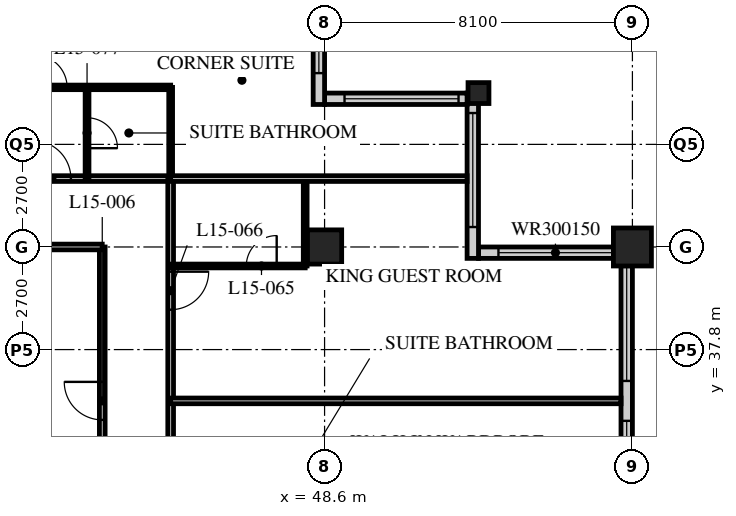
"""IFC4 building model, lengths in metres.
Left out: names, types, materials, properties, quantities, classifications, styles, units other than length and angle.
Written with IfcOpenShell. Run it as: python <this file> out.ifc"""

import sys

from ifc_helpers import new_model, si_unit, direction, frame, frame_2d, origin, origin_2d, place, context, subcontext, project, spatial, rectangle, hollow_rectangle, extrude, element, fill, save


model = new_model("IFC4")
c1 = context("Model", 3, precision=1e-05, world=origin(), true_north=direction((0.0, 1.0)))
c2 = subcontext(c1, "Body", "Model", "MODEL_VIEW")
j1 = project(units=[si_unit("LENGTHUNIT", "METRE"), si_unit("PLANEANGLEUNIT", "RADIAN")], contexts=[c1])
p1 = place(None, origin())
s1 = spatial("IfcSite", under=j1, at=p1, CompositionType="ELEMENT")
p2 = place(p1, origin())
s2 = spatial("IfcBuilding", under=s1, at=p2, CompositionType="ELEMENT")
p3 = place(p2, frame((0.0, 0.0, 63.6)))
s3 = spatial("IfcBuildingStorey", under=s2, at=p3, CompositionType="ELEMENT", Elevation=63.6)
p4 = place(p3, frame((48.6, 40.5, 0.0), z_axis=(0.0, 0.0, 1.0), x_axis=(1.0, 0.0, 0.0)))
e1 = element("IfcColumn", 1, at=p4, inside=s3, PredefinedType="COLUMN", context=c2, shape_type="SweptSolid", body=[
    extrude(hollow_rectangle(XDim=0.9, YDim=0.9, WallThickness=0.09, at=origin_2d()), origin(), (0.0, 0.0, 1.0), 3.4),
])
p5 = place(p3, frame((52.65, 44.55, 0.0), z_axis=(0.0, 0.0, 1.0), x_axis=(1.0, 0.0, 0.0)))
e2 = element("IfcColumn", 2, at=p5, inside=s3, PredefinedType="COLUMN", context=c2, shape_type="SweptSolid", body=[
    extrude(hollow_rectangle(XDim=0.55, YDim=0.55, WallThickness=0.05, at=origin_2d()), origin(), (0.0, 0.0, 1.0), 3.4),
])
p6 = place(p3, frame((56.7, 40.5, 0.0), z_axis=(0.0, 0.0, 1.0), x_axis=(1.0, 0.0, 0.0)))
e3 = element("IfcColumn", 3, at=p6, inside=s3, PredefinedType="COLUMN", context=c2, shape_type="SweptSolid", body=[
    extrude(hollow_rectangle(XDim=1.0, YDim=1.0, WallThickness=0.1, at=origin_2d()), origin(), (0.0, 0.0, 1.0), 3.4),
])
p7 = place(p3, frame((56.55, 8.4, 0.0), z_axis=(0.0, 0.0, 1.0), x_axis=(0.0, 1.0, 0.0)))
e4 = element("IfcWall", 4, at=p7, inside=s3, PredefinedType="SOLIDWALL", context=c2, shape_type="SweptSolid", body=[
    extrude(rectangle(XDim=32.1, YDim=0.3, at=frame_2d((16.05, 0.0))), origin(), (0.0, 0.0, 1.0), 3.19),
])
p8 = place(p7, frame((0.225, 0.0, 0.9)))
e5 = element("IfcOpeningElement", 5, at=p8, cuts=e4, PredefinedType="OPENING", context=c2, shape_type="SweptSolid", body=[
    extrude(rectangle(XDim=3.0, YDim=2.0, at=frame_2d((1.5, 1.0))), frame((0.0, 0.16, 0.0), z_axis=(0.0, -1.0, 0.0), x_axis=(1.0, 0.0, 0.0)), (0.0, 0.0, 1.0), 0.32),
])
p9 = place(p7, frame((4.275, 0.0, 0.9)))
e6 = element("IfcOpeningElement", 6, at=p9, cuts=e4, PredefinedType="OPENING", context=c2, shape_type="SweptSolid", body=[
    extrude(rectangle(XDim=3.0, YDim=2.0, at=frame_2d((1.5, 1.0))), frame((0.0, 0.16, 0.0), z_axis=(0.0, -1.0, 0.0), x_axis=(1.0, 0.0, 0.0)), (0.0, 0.0, 1.0), 0.32),
])
p10 = place(p7, frame((8.325, 0.0, 0.9)))
e7 = element("IfcOpeningElement", 7, at=p10, cuts=e4, PredefinedType="OPENING", context=c2, shape_type="SweptSolid", body=[
    extrude(rectangle(XDim=3.0, YDim=2.0, at=frame_2d((1.5, 1.0))), frame((0.0, 0.16, 0.0), z_axis=(0.0, -1.0, 0.0), x_axis=(1.0, 0.0, 0.0)), (0.0, 0.0, 1.0), 0.32),
])
p11 = place(p7, frame((12.375, 0.0, 0.9)))
e8 = element("IfcOpeningElement", 8, at=p11, cuts=e4, PredefinedType="OPENING", context=c2, shape_type="SweptSolid", body=[
    extrude(rectangle(XDim=3.0, YDim=2.0, at=frame_2d((1.5, 1.0))), frame((0.0, 0.16, 0.0), z_axis=(0.0, -1.0, 0.0), x_axis=(1.0, 0.0, 0.0)), (0.0, 0.0, 1.0), 0.32),
])
p12 = place(p7, frame((16.425, 0.0, 0.9)))
e9 = element("IfcOpeningElement", 9, at=p12, cuts=e4, PredefinedType="OPENING", context=c2, shape_type="SweptSolid", body=[
    extrude(rectangle(XDim=3.0, YDim=2.0, at=frame_2d((1.5, 1.0))), frame((0.0, 0.16, 0.0), z_axis=(0.0, -1.0, 0.0), x_axis=(1.0, 0.0, 0.0)), (0.0, 0.0, 1.0), 0.32),
])
p13 = place(p7, frame((20.475, 0.0, 0.9)))
e10 = element("IfcOpeningElement", 10, at=p13, cuts=e4, PredefinedType="OPENING", context=c2, shape_type="SweptSolid", body=[
    extrude(rectangle(XDim=3.0, YDim=2.0, at=frame_2d((1.5, 1.0))), frame((0.0, 0.16, 0.0), z_axis=(0.0, -1.0, 0.0), x_axis=(1.0, 0.0, 0.0)), (0.0, 0.0, 1.0), 0.32),
])
p14 = place(p7, frame((24.525, 0.0, 0.9)))
e11 = element("IfcOpeningElement", 11, at=p14, cuts=e4, PredefinedType="OPENING", context=c2, shape_type="SweptSolid", body=[
    extrude(rectangle(XDim=3.0, YDim=2.0, at=frame_2d((1.5, 1.0))), frame((0.0, 0.16, 0.0), z_axis=(0.0, -1.0, 0.0), x_axis=(1.0, 0.0, 0.0)), (0.0, 0.0, 1.0), 0.32),
])
p15 = place(p7, frame((28.575, 0.0, 0.9)))
e12 = element("IfcOpeningElement", 12, at=p15, cuts=e4, PredefinedType="OPENING", context=c2, shape_type="SweptSolid", body=[
    extrude(rectangle(XDim=3.0, YDim=2.0, at=frame_2d((1.5, 1.0))), frame((0.0, 0.16, 0.0), z_axis=(0.0, -1.0, 0.0), x_axis=(1.0, 0.0, 0.0)), (0.0, 0.0, 1.0), 0.32),
])
p16 = place(p3, frame((56.4, 40.35, 0.0), z_axis=(0.0, 0.0, 1.0), x_axis=(-1.0, 0.0, 0.0)))
e13 = element("IfcWall", 13, at=p16, inside=s3, PredefinedType="SOLIDWALL", context=c2, shape_type="SweptSolid", body=[
    extrude(rectangle(XDim=3.75, YDim=0.3, at=frame_2d((1.875, 0.0))), origin(), (0.0, 0.0, 1.0), 3.19),
])
p17 = place(p16, frame((0.225, 0.0, 0.9)))
e14 = element("IfcOpeningElement", 14, at=p17, cuts=e13, PredefinedType="OPENING", context=c2, shape_type="SweptSolid", body=[
    extrude(rectangle(XDim=3.0, YDim=1.5, at=frame_2d((1.5, 0.75))), frame((0.0, 0.16, 0.0), z_axis=(0.0, -1.0, 0.0), x_axis=(1.0, 0.0, 0.0)), (0.0, 0.0, 1.0), 0.32),
])
p18 = place(p3, frame((52.5, 40.2, 0.0), z_axis=(0.0, 0.0, 1.0), x_axis=(0.0, 1.0, 0.0)))
e15 = element("IfcWall", 15, at=p18, inside=s3, PredefinedType="SOLIDWALL", context=c2, shape_type="SweptSolid", body=[
    extrude(rectangle(XDim=4.35, YDim=0.3, at=frame_2d((2.175, 0.0))), origin(), (0.0, 0.0, 1.0), 3.19),
])
p19 = place(p18, frame((0.825, 0.0, 0.9)))
e16 = element("IfcOpeningElement", 16, at=p19, cuts=e15, PredefinedType="OPENING", context=c2, shape_type="SweptSolid", body=[
    extrude(rectangle(XDim=3.0, YDim=1.5, at=frame_2d((1.5, 0.75))), frame((0.0, 0.16, 0.0), z_axis=(0.0, -1.0, 0.0), x_axis=(1.0, 0.0, 0.0)), (0.0, 0.0, 1.0), 0.32),
])
p20 = place(p3, frame((52.35, 44.4, 0.0), z_axis=(0.0, 0.0, 1.0), x_axis=(-1.0, 0.0, 0.0)))
e17 = element("IfcWall", 17, at=p20, inside=s3, PredefinedType="SOLIDWALL", context=c2, shape_type="SweptSolid", body=[
    extrude(rectangle(XDim=3.75, YDim=0.3, at=frame_2d((1.875, 0.0))), origin(), (0.0, 0.0, 1.0), 3.19),
])
p21 = place(p20, frame((0.225, 0.0, 0.9)))
e18 = element("IfcOpeningElement", 18, at=p21, cuts=e17, PredefinedType="OPENING", context=c2, shape_type="SweptSolid", body=[
    extrude(rectangle(XDim=3.0, YDim=1.5, at=frame_2d((1.5, 0.75))), frame((0.0, 0.16, 0.0), z_axis=(0.0, -1.0, 0.0), x_axis=(1.0, 0.0, 0.0)), (0.0, 0.0, 1.0), 0.32),
])
p22 = place(p3, frame((48.45, 44.25, 0.0), z_axis=(0.0, 0.0, 1.0), x_axis=(0.0, 1.0, 0.0)))
e19 = element("IfcWall", 19, at=p22, inside=s3, PredefinedType="SOLIDWALL", context=c2, shape_type="SweptSolid", body=[
    extrude(rectangle(XDim=4.35, YDim=0.3, at=frame_2d((2.175, 0.0))), origin(), (0.0, 0.0, 1.0), 3.19),
])
p23 = place(p22, frame((0.825, 0.0, 0.9)))
e20 = element("IfcOpeningElement", 20, at=p23, cuts=e19, PredefinedType="OPENING", context=c2, shape_type="SweptSolid", body=[
    extrude(rectangle(XDim=3.0, YDim=1.5, at=frame_2d((1.5, 0.75))), frame((0.0, 0.16, 0.0), z_axis=(0.0, -1.0, 0.0), x_axis=(1.0, 0.0, 0.0)), (0.0, 0.0, 1.0), 0.32),
])
p24 = place(p3, frame((8.1, 42.3, 0.0), z_axis=(0.0, 0.0, 1.0), x_axis=(1.0, 0.0, 0.0)))
e21 = element("IfcWall", 21, at=p24, inside=s3, PredefinedType="PARTITIONING", context=c2, shape_type="SweptSolid", body=[
    extrude(rectangle(XDim=36.45, YDim=0.15, at=frame_2d((18.225, 0.0))), origin(), (0.0, 0.0, 1.0), 3.19),
])
p25 = place(p24, frame((9.5, 0.0, 0.0)))
e22 = element("IfcOpeningElement", 22, at=p25, cuts=e21, PredefinedType="OPENING", context=c2, shape_type="SweptSolid", body=[
    extrude(rectangle(XDim=1.0, YDim=2.1, at=frame_2d((0.5, 1.05))), frame((0.0, 0.085, 0.0), z_axis=(0.0, -1.0, 0.0), x_axis=(1.0, 0.0, 0.0)), (0.0, 0.0, 1.0), 0.17),
])
p26 = place(p24, frame((14.6, 0.0, 0.0)))
e23 = element("IfcOpeningElement", 23, at=p26, cuts=e21, PredefinedType="OPENING", context=c2, shape_type="SweptSolid", body=[
    extrude(rectangle(XDim=1.0, YDim=2.1, at=frame_2d((0.5, 1.05))), frame((0.0, 0.085, 0.0), z_axis=(0.0, -1.0, 0.0), x_axis=(1.0, 0.0, 0.0)), (0.0, 0.0, 1.0), 0.17),
])
p27 = place(p24, frame((18.65, 0.0, 0.0)))
e24 = element("IfcOpeningElement", 24, at=p27, cuts=e21, PredefinedType="OPENING", context=c2, shape_type="SweptSolid", body=[
    extrude(rectangle(XDim=1.0, YDim=2.1, at=frame_2d((0.5, 1.05))), frame((0.0, 0.085, 0.0), z_axis=(0.0, -1.0, 0.0), x_axis=(1.0, 0.0, 0.0)), (0.0, 0.0, 1.0), 0.17),
])
p28 = place(p24, frame((25.7, 0.0, 0.0)))
e25 = element("IfcOpeningElement", 25, at=p28, cuts=e21, PredefinedType="OPENING", context=c2, shape_type="SweptSolid", body=[
    extrude(rectangle(XDim=1.0, YDim=2.1, at=frame_2d((0.5, 1.05))), frame((0.0, 0.085, 0.0), z_axis=(0.0, -1.0, 0.0), x_axis=(1.0, 0.0, 0.0)), (0.0, 0.0, 1.0), 0.17),
])
p29 = place(p24, frame((30.8, 0.0, 0.0)))
e26 = element("IfcOpeningElement", 26, at=p29, cuts=e21, PredefinedType="OPENING", context=c2, shape_type="SweptSolid", body=[
    extrude(rectangle(XDim=1.0, YDim=2.1, at=frame_2d((0.5, 1.05))), frame((0.0, 0.085, 0.0), z_axis=(0.0, -1.0, 0.0), x_axis=(1.0, 0.0, 0.0)), (0.0, 0.0, 1.0), 0.17),
])
p30 = place(p24, frame((32.825, 0.0, 0.0)))
e27 = element("IfcOpeningElement", 27, at=p30, cuts=e21, PredefinedType="OPENING", context=c2, shape_type="SweptSolid", body=[
    extrude(rectangle(XDim=1.0, YDim=2.1, at=frame_2d((0.5, 1.05))), frame((0.0, 0.085, 0.0), z_axis=(0.0, -1.0, 0.0), x_axis=(1.0, 0.0, 0.0)), (0.0, 0.0, 1.0), 0.17),
])
p31 = place(p24, frame((2.625, 0.0, 0.0)))
e28 = element("IfcOpeningElement", 28, at=p31, cuts=e21, PredefinedType="OPENING", context=c2, shape_type="SweptSolid", body=[
    extrude(rectangle(XDim=1.0, YDim=2.1, at=frame_2d((0.5, 1.05))), frame((0.0, 0.085, 0.0), z_axis=(0.0, -1.0, 0.0), x_axis=(1.0, 0.0, 0.0)), (0.0, 0.0, 1.0), 0.17),
])
p32 = place(p3, frame((44.55, 12.15, 0.0), z_axis=(0.0, 0.0, 1.0), x_axis=(0.0, 1.0, 0.0)))
e29 = element("IfcWall", 29, at=p32, inside=s3, PredefinedType="PARTITIONING", context=c2, shape_type="SweptSolid", body=[
    extrude(rectangle(XDim=30.15, YDim=0.15, at=frame_2d((15.075, 0.0))), origin(), (0.0, 0.0, 1.0), 3.19),
])
p33 = place(p32, frame((2.45, 0.0, 0.0)))
e30 = element("IfcOpeningElement", 30, at=p33, cuts=e29, PredefinedType="OPENING", context=c2, shape_type="SweptSolid", body=[
    extrude(rectangle(XDim=1.0, YDim=2.1, at=frame_2d((0.5, 1.05))), frame((0.0, 0.085, 0.0), z_axis=(0.0, -1.0, 0.0), x_axis=(1.0, 0.0, 0.0)), (0.0, 0.0, 1.0), 0.17),
])
p34 = place(p32, frame((4.35, 0.0, 0.0)))
e31 = element("IfcOpeningElement", 31, at=p34, cuts=e29, PredefinedType="OPENING", context=c2, shape_type="SweptSolid", body=[
    extrude(rectangle(XDim=1.0, YDim=2.1, at=frame_2d((0.5, 1.05))), frame((0.0, 0.085, 0.0), z_axis=(0.0, -1.0, 0.0), x_axis=(1.0, 0.0, 0.0)), (0.0, 0.0, 1.0), 0.17),
])
p35 = place(p32, frame((8.4, 0.0, 0.0)))
e32 = element("IfcOpeningElement", 32, at=p35, cuts=e29, PredefinedType="OPENING", context=c2, shape_type="SweptSolid", body=[
    extrude(rectangle(XDim=1.0, YDim=2.1, at=frame_2d((0.5, 1.05))), frame((0.0, 0.085, 0.0), z_axis=(0.0, -1.0, 0.0), x_axis=(1.0, 0.0, 0.0)), (0.0, 0.0, 1.0), 0.17),
])
p36 = place(p32, frame((14.6, 0.0, 0.0)))
e33 = element("IfcOpeningElement", 33, at=p36, cuts=e29, PredefinedType="OPENING", context=c2, shape_type="SweptSolid", body=[
    extrude(rectangle(XDim=1.0, YDim=2.1, at=frame_2d((0.5, 1.05))), frame((0.0, 0.085, 0.0), z_axis=(0.0, -1.0, 0.0), x_axis=(1.0, 0.0, 0.0)), (0.0, 0.0, 1.0), 0.17),
])
p37 = place(p32, frame((21.65, 0.0, 0.0)))
e34 = element("IfcOpeningElement", 34, at=p37, cuts=e29, PredefinedType="OPENING", context=c2, shape_type="SweptSolid", body=[
    extrude(rectangle(XDim=1.0, YDim=2.1, at=frame_2d((0.5, 1.05))), frame((0.0, 0.085, 0.0), z_axis=(0.0, -1.0, 0.0), x_axis=(1.0, 0.0, 0.0)), (0.0, 0.0, 1.0), 0.17),
])
p38 = place(p32, frame((26.7, 0.0, 0.0)))
e35 = element("IfcOpeningElement", 35, at=p38, cuts=e29, PredefinedType="OPENING", context=c2, shape_type="SweptSolid", body=[
    extrude(rectangle(XDim=1.0, YDim=2.1, at=frame_2d((0.5, 1.05))), frame((0.0, 0.085, 0.0), z_axis=(0.0, -1.0, 0.0), x_axis=(1.0, 0.0, 0.0)), (0.0, 0.0, 1.0), 0.17),
])
p39 = place(p3, frame((42.75, 13.95, 0.0), z_axis=(0.0, 0.0, 1.0), x_axis=(0.0, 1.0, 0.0)))
e36 = element("IfcWall", 36, at=p39, inside=s3, PredefinedType="PARTITIONING", context=c2, shape_type="SweptSolid", body=[
    extrude(rectangle(XDim=26.55, YDim=0.15, at=frame_2d((13.275, 0.0))), origin(), (0.0, 0.0, 1.0), 3.19),
])
p40 = place(p39, frame((13.9, 0.0, 0.0)))
e37 = element("IfcOpeningElement", 37, at=p40, cuts=e36, PredefinedType="OPENING", context=c2, shape_type="SweptSolid", body=[
    extrude(rectangle(XDim=1.0, YDim=2.1, at=frame_2d((0.5, 1.05))), frame((0.0, 0.085, 0.0), z_axis=(0.0, -1.0, 0.0), x_axis=(1.0, 0.0, 0.0)), (0.0, 0.0, 1.0), 0.17),
])
p41 = place(p39, frame((22.0, 0.0, 0.0)))
e38 = element("IfcOpeningElement", 38, at=p41, cuts=e36, PredefinedType="OPENING", context=c2, shape_type="SweptSolid", body=[
    extrude(rectangle(XDim=1.0, YDim=2.1, at=frame_2d((0.5, 1.05))), frame((0.0, 0.085, 0.0), z_axis=(0.0, -1.0, 0.0), x_axis=(1.0, 0.0, 0.0)), (0.0, 0.0, 1.0), 0.17),
])
p42 = place(p3, frame((42.75, 40.5, 0.0), z_axis=(0.0, 0.0, 1.0), x_axis=(-1.0, 0.0, 0.0)))
e39 = element("IfcWall", 39, at=p42, inside=s3, PredefinedType="PARTITIONING", context=c2, shape_type="SweptSolid", body=[
    extrude(rectangle(XDim=2.05, YDim=0.15, at=frame_2d((1.025, 0.0))), origin(), (0.0, 0.0, 1.0), 2.578),
])
p43 = place(p3, frame((44.55, 36.45, 0.0), z_axis=(0.0, 0.0, 1.0), x_axis=(1.0, 0.0, 0.0)))
e40 = element("IfcWall", 40, at=p43, inside=s3, PredefinedType="PARTITIONING", context=c2, shape_type="SweptSolid", body=[
    extrude(rectangle(XDim=11.85, YDim=0.15, at=frame_2d((5.925, 0.0))), origin(), (0.0, 0.0, 1.0), 3.19),
])
p44 = place(p3, frame((48.09, 40.0, 0.0), z_axis=(0.0, 0.0, 1.0), x_axis=(0.0, 1.0, 0.0)))
e41 = element("IfcWall", 41, at=p44, inside=s3, PredefinedType="PARTITIONING", context=c2, shape_type="SweptSolid", body=[
    extrude(rectangle(XDim=2.3, YDim=0.1, at=frame_2d((1.15, 0.0))), origin(), (0.0, 0.0, 1.0), 3.19),
])
p45 = place(p3, frame((44.55, 40.0, 0.0), z_axis=(0.0, 0.0, 1.0), x_axis=(1.0, 0.0, 0.0)))
e42 = element("IfcWall", 42, at=p45, inside=s3, PredefinedType="PARTITIONING", context=c2, shape_type="SweptSolid", body=[
    extrude(rectangle(XDim=3.54, YDim=0.1, at=frame_2d((1.77, 0.0))), origin(), (0.0, 0.0, 1.0), 3.19),
])
p46 = place(p45, frame((1.99, 0.0, 0.0)))
e43 = element("IfcOpeningElement", 43, at=p46, cuts=e42, PredefinedType="OPENING", context=c2, shape_type="SweptSolid", body=[
    extrude(rectangle(XDim=0.8, YDim=2.1, at=frame_2d((0.4, 1.05))), frame((0.0, 0.06, 0.0), z_axis=(0.0, -1.0, 0.0), x_axis=(1.0, 0.0, 0.0)), (0.0, 0.0, 1.0), 0.12),
])
p47 = place(p3, frame((40.5, 44.7, 0.0), z_axis=(0.0, 0.0, 1.0), x_axis=(1.0, 0.0, 0.0)))
e44 = element("IfcWall", 44, at=p47, inside=s3, PredefinedType="PARTITIONING", context=c2, shape_type="SweptSolid", body=[
    extrude(rectangle(XDim=4.05, YDim=0.12, at=frame_2d((2.025, 0.0))), origin(), (0.0, 0.0, 1.0), 3.19),
])
p48 = place(p47, frame((0.475, 0.0, 0.0)))
e45 = element("IfcOpeningElement", 45, at=p48, cuts=e44, PredefinedType="OPENING", context=c2, shape_type="SweptSolid", body=[
    extrude(rectangle(XDim=0.85, YDim=2.1, at=frame_2d((0.425, 1.05))), frame((0.0, 0.07, 0.0), z_axis=(0.0, -1.0, 0.0), x_axis=(1.0, 0.0, 0.0)), (0.0, 0.0, 1.0), 0.14),
])
p49 = place(p3, frame((42.35, 42.3, 0.0), z_axis=(0.0, 0.0, 1.0), x_axis=(0.0, 1.0, 0.0)))
e46 = element("IfcWall", 46, at=p49, inside=s3, PredefinedType="PARTITIONING", context=c2, shape_type="SweptSolid", body=[
    extrude(rectangle(XDim=2.4, YDim=0.1, at=frame_2d((1.2, 0.0))), origin(), (0.0, 0.0, 1.0), 3.19),
])
p50 = place(p49, frame((0.8, 0.0, 0.0)))
e47 = element("IfcOpeningElement", 47, at=p50, cuts=e46, PredefinedType="OPENING", context=c2, shape_type="SweptSolid", body=[
    extrude(rectangle(XDim=0.8, YDim=2.1, at=frame_2d((0.4, 1.05))), frame((0.0, 0.06, 0.0), z_axis=(0.0, -1.0, 0.0), x_axis=(1.0, 0.0, 0.0)), (0.0, 0.0, 1.0), 0.12),
])
p51 = place(p3, frame((44.55, 42.3, 0.0), z_axis=(0.0, 0.0, 1.0), x_axis=(0.0, 1.0, 0.0)))
e48 = element("IfcWall", 48, at=p51, inside=s3, PredefinedType="PARTITIONING", context=c2, shape_type="SweptSolid", body=[
    extrude(rectangle(XDim=2.4, YDim=0.1, at=frame_2d((1.2, 0.0))), origin(), (0.0, 0.0, 1.0), 3.19),
])
p52 = place(p3, frame((44.55, 42.3, 0.0), z_axis=(0.0, 0.0, 1.0), x_axis=(1.0, 0.0, 0.0)))
e49 = element("IfcWall", 49, at=p52, inside=s3, PredefinedType="PARTITIONING", context=c2, shape_type="SweptSolid", body=[
    extrude(rectangle(XDim=7.8, YDim=0.15, at=frame_2d((3.9, 0.0))), origin(), (0.0, 0.0, 1.0), 3.19),
])
p53 = place(p14, origin())
e50 = element("IfcWindow", 50, at=p53, inside=s3, PartitioningType="SINGLE_PANEL", PredefinedType="WINDOW", context=c2, shape_type="SweptSolid", body=[
    extrude(rectangle(XDim=3.0, YDim=2.0, at=frame_2d((1.5, 1.0))), frame((0.0, 0.03, 0.0), z_axis=(0.0, -1.0, 0.0), x_axis=(1.0, 0.0, 0.0)), (0.0, 0.0, 1.0), 0.06),
])
fill(e11, e50)
p54 = place(p15, origin())
e51 = element("IfcWindow", 51, at=p54, inside=s3, PartitioningType="SINGLE_PANEL", PredefinedType="WINDOW", context=c2, shape_type="SweptSolid", body=[
    extrude(rectangle(XDim=3.0, YDim=2.0, at=frame_2d((1.5, 1.0))), frame((0.0, 0.03, 0.0), z_axis=(0.0, -1.0, 0.0), x_axis=(1.0, 0.0, 0.0)), (0.0, 0.0, 1.0), 0.06),
])
fill(e12, e51)
p55 = place(p17, origin())
e52 = element("IfcWindow", 52, at=p55, inside=s3, PartitioningType="SINGLE_PANEL", PredefinedType="WINDOW", context=c2, shape_type="SweptSolid", body=[
    extrude(rectangle(XDim=3.0, YDim=1.5, at=frame_2d((1.5, 0.75))), frame((0.0, 0.03, 0.0), z_axis=(0.0, -1.0, 0.0), x_axis=(1.0, 0.0, 0.0)), (0.0, 0.0, 1.0), 0.06),
])
fill(e14, e52)
p56 = place(p19, origin())
e53 = element("IfcWindow", 53, at=p56, inside=s3, PartitioningType="SINGLE_PANEL", PredefinedType="WINDOW", context=c2, shape_type="SweptSolid", body=[
    extrude(rectangle(XDim=3.0, YDim=1.5, at=frame_2d((1.5, 0.75))), frame((0.0, 0.03, 0.0), z_axis=(0.0, -1.0, 0.0), x_axis=(1.0, 0.0, 0.0)), (0.0, 0.0, 1.0), 0.06),
])
fill(e16, e53)
p57 = place(p21, origin())
e54 = element("IfcWindow", 54, at=p57, inside=s3, PartitioningType="SINGLE_PANEL", PredefinedType="WINDOW", context=c2, shape_type="SweptSolid", body=[
    extrude(rectangle(XDim=3.0, YDim=1.5, at=frame_2d((1.5, 0.75))), frame((0.0, 0.03, 0.0), z_axis=(0.0, -1.0, 0.0), x_axis=(1.0, 0.0, 0.0)), (0.0, 0.0, 1.0), 0.06),
])
fill(e18, e54)
p58 = place(p23, origin())
e55 = element("IfcWindow", 55, at=p58, inside=s3, PartitioningType="SINGLE_PANEL", PredefinedType="WINDOW", context=c2, shape_type="SweptSolid", body=[
    extrude(rectangle(XDim=3.0, YDim=1.5, at=frame_2d((1.5, 0.75))), frame((0.0, 0.03, 0.0), z_axis=(0.0, -1.0, 0.0), x_axis=(1.0, 0.0, 0.0)), (0.0, 0.0, 1.0), 0.06),
])
fill(e20, e55)
p59 = place(p41, origin())
e56 = element("IfcDoor", 56, at=p59, inside=s3, OperationType="SINGLE_SWING_RIGHT", PredefinedType="DOOR", context=c2, shape_type="SweptSolid", body=[
    extrude(rectangle(XDim=1.0, YDim=2.1, at=frame_2d((0.5, 1.05))), frame((0.0, 0.025, 0.0), z_axis=(0.0, -1.0, 0.0), x_axis=(1.0, 0.0, 0.0)), (0.0, 0.0, 1.0), 0.05),
])
fill(e38, e56)
p60 = place(p46, origin())
e57 = element("IfcDoor", 57, at=p60, inside=s3, OperationType="SINGLE_SWING_RIGHT", PredefinedType="DOOR", context=c2, shape_type="SweptSolid", body=[
    extrude(rectangle(XDim=0.8, YDim=2.1, at=frame_2d((0.4, 1.05))), frame((0.0, 0.025, 0.0), z_axis=(0.0, -1.0, 0.0), x_axis=(1.0, 0.0, 0.0)), (0.0, 0.0, 1.0), 0.05),
])
fill(e43, e57)
p61 = place(p38, origin())
e58 = element("IfcDoor", 58, at=p61, inside=s3, OperationType="SINGLE_SWING_LEFT", PredefinedType="DOOR", context=c2, shape_type="SweptSolid", body=[
    extrude(rectangle(XDim=1.0, YDim=2.1, at=frame_2d((0.5, 1.05))), frame((0.0, 0.025, 0.0), z_axis=(0.0, -1.0, 0.0), x_axis=(1.0, 0.0, 0.0)), (0.0, 0.0, 1.0), 0.05),
])
fill(e35, e58)
p62 = place(p50, origin())
e59 = element("IfcDoor", 59, at=p62, inside=s3, OperationType="SINGLE_SWING_RIGHT", PredefinedType="DOOR", context=c2, shape_type="SweptSolid", body=[
    extrude(rectangle(XDim=0.8, YDim=2.1, at=frame_2d((0.4, 1.05))), frame((0.0, 0.025, 0.0), z_axis=(0.0, -1.0, 0.0), x_axis=(1.0, 0.0, 0.0)), (0.0, 0.0, 1.0), 0.05),
])
fill(e47, e59)
p63 = place(p30, origin())
e60 = element("IfcDoor", 60, at=p63, inside=s3, OperationType="SINGLE_SWING_LEFT", PredefinedType="DOOR", context=c2, shape_type="SweptSolid", body=[
    extrude(rectangle(XDim=1.0, YDim=2.1, at=frame_2d((0.5, 1.05))), frame((0.0, 0.025, 0.0), z_axis=(0.0, -1.0, 0.0), x_axis=(1.0, 0.0, 0.0)), (0.0, 0.0, 1.0), 0.05),
])
fill(e27, e60)
p64 = place(p48, origin())
e61 = element("IfcDoor", 61, at=p64, inside=s3, OperationType="SINGLE_SWING_LEFT", PredefinedType="DOOR", context=c2, shape_type="SweptSolid", body=[
    extrude(rectangle(XDim=0.85, YDim=2.1, at=frame_2d((0.425, 1.05))), frame((0.0, 0.025, 0.0), z_axis=(0.0, -1.0, 0.0), x_axis=(1.0, 0.0, 0.0)), (0.0, 0.0, 1.0), 0.05),
])
fill(e45, e61)
save(model, sys.argv[1])
